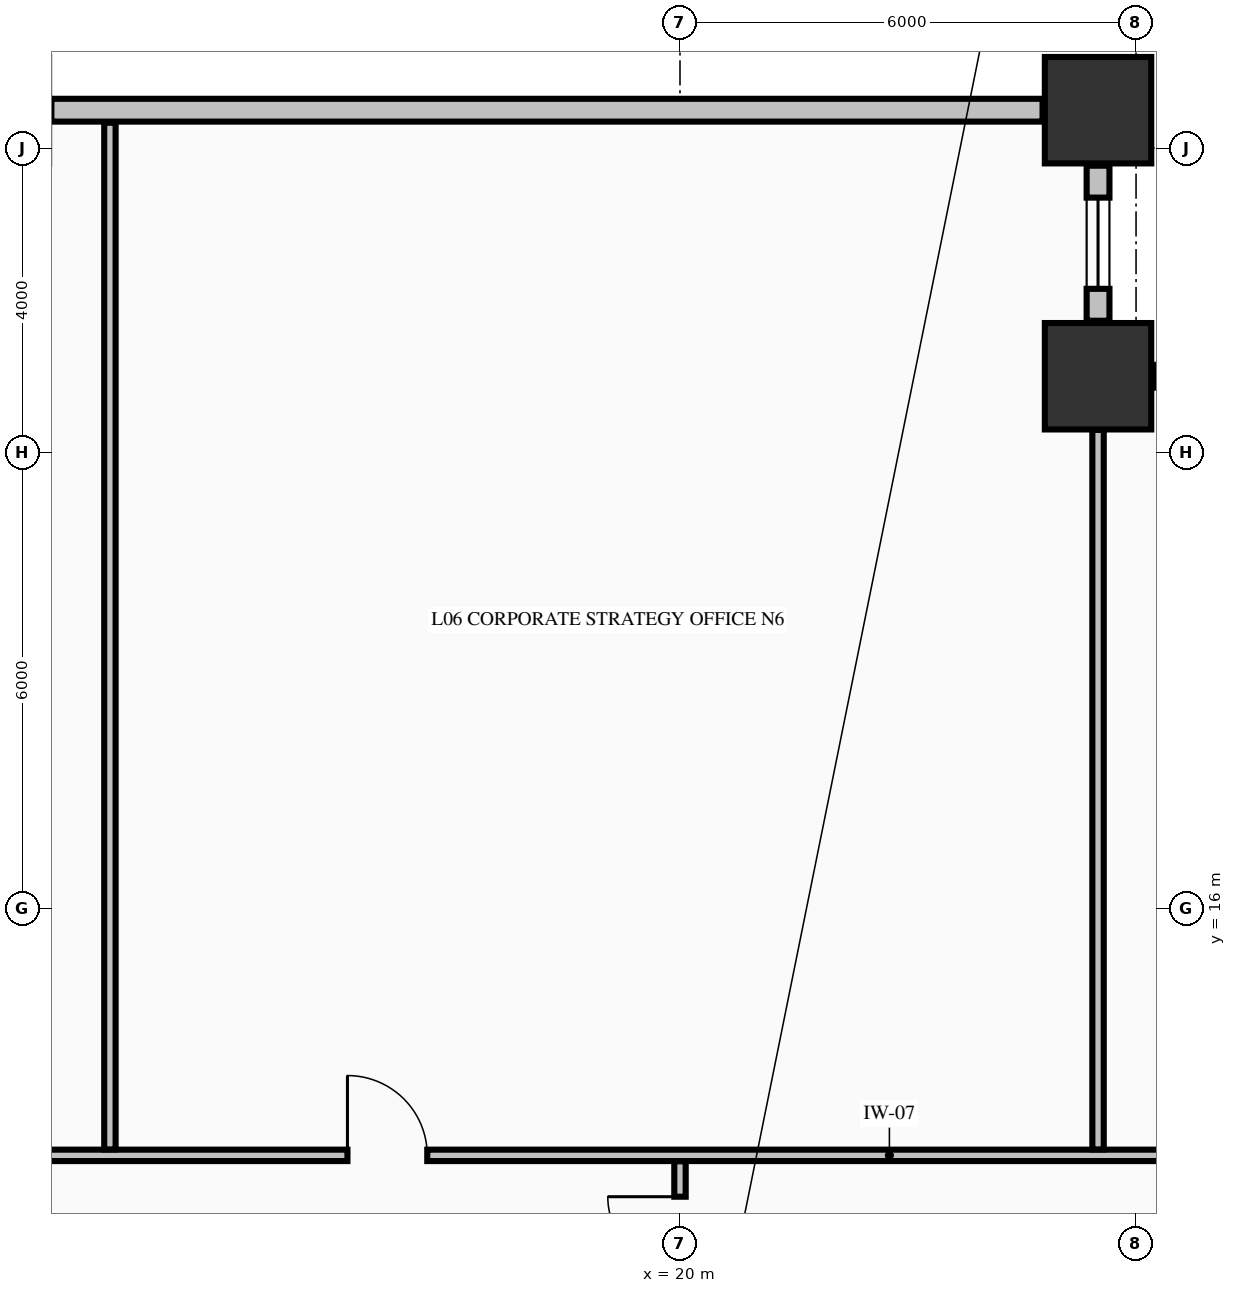
"""IFC4 building model, lengths in metres.
Left out: names, types, materials, properties, quantities, classifications, styles, units other than length and angle.
Written with IfcOpenShell. Run it as: python <this file> out.ifc"""

import sys

from ifc_helpers import new_model, si_unit, direction, frame, frame_2d, origin, origin_2d, place, context, subcontext, project, spatial, rectangle, extrude, element, fill, save


model = new_model("IFC4")
c1 = context("Model", 3, precision=1e-05, world=origin(), true_north=direction((0.0, 1.0)))
c2 = subcontext(c1, "Body", "Model", "MODEL_VIEW")
j1 = project(units=[si_unit("LENGTHUNIT", "METRE"), si_unit("PLANEANGLEUNIT", "RADIAN")], contexts=[c1])
p1 = place(None, origin())
s1 = spatial("IfcSite", under=j1, at=p1, CompositionType="ELEMENT")
p2 = place(p1, origin())
s2 = spatial("IfcBuilding", under=s1, at=p2, CompositionType="ELEMENT")
p3 = place(p2, frame((0.0, 0.0, 30.77)))
s3 = spatial("IfcBuildingStorey", under=s2, at=p3, CompositionType="ELEMENT", Elevation=30.77)
for number, where, z_axis, x_axis in (
    (1, (25.5, 26.5, -0.25), (0.0, 0.0, 1.0), (1.0, 0.0, 0.0)),
    (2, (25.5, 23.0, -0.25), (0.0, 0.0, 1.0), (1.0, 0.0, 0.0)),
):
    element("IfcColumn", number, at=place(p3, frame(where, z_axis=z_axis, x_axis=x_axis)), inside=s3, PredefinedType="COLUMN", context=c2, shape_type="SweptSolid", body=[
        extrude(rectangle(XDim=1.4, YDim=1.4, at=origin_2d()), origin(), (0.0, 0.0, 1.0), 3.52),
    ])
p4 = place(p3, frame((28.27, 23.0, 0.0), z_axis=(0.0, 0.0, 1.0), x_axis=(-1.0, 0.0, 0.0)))
e3 = element("IfcWall", 3, at=p4, inside=s3, PredefinedType="STANDARD", context=c2, shape_type="SweptSolid", body=[
    extrude(rectangle(XDim=2.04, YDim=0.3, at=frame_2d((1.02, 0.0))), origin(), (0.0, 0.0, 1.0), 2.662),
])
p5 = place(p4, frame((0.42, 0.0, 0.82)))
e4 = element("IfcOpeningElement", 4, at=p5, cuts=e3, PredefinedType="OPENING", context=c2, shape_type="SweptSolid", body=[
    extrude(rectangle(XDim=1.2, YDim=1.65, at=frame_2d((0.6, 0.825))), frame((0.0, 0.16, 0.0), z_axis=(0.0, -1.0, 0.0), x_axis=(1.0, 0.0, 0.0)), (0.0, 0.0, 1.0), 0.32),
])
p6 = place(p3, frame((25.5, 23.73, 0.0), z_axis=(0.0, 0.0, 1.0), x_axis=(0.0, 1.0, 0.0)))
e5 = element("IfcWall", 5, at=p6, inside=s3, PredefinedType="STANDARD", context=c2, shape_type="SweptSolid", body=[
    extrude(rectangle(XDim=2.04, YDim=0.3, at=frame_2d((1.02, 0.0))), origin(), (0.0, 0.0, 1.0), 2.662),
])
p7 = place(p6, frame((0.42, 0.0, 0.82)))
e6 = element("IfcOpeningElement", 6, at=p7, cuts=e5, PredefinedType="OPENING", context=c2, shape_type="SweptSolid", body=[
    extrude(rectangle(XDim=1.2, YDim=1.65, at=frame_2d((0.6, 0.825))), frame((0.0, 0.16, 0.0), z_axis=(0.0, -1.0, 0.0), x_axis=(1.0, 0.0, 0.0)), (0.0, 0.0, 1.0), 0.32),
])
p8 = place(p3, frame((24.77, 26.5, 0.0), z_axis=(0.0, 0.0, 1.0), x_axis=(-1.0, 0.0, 0.0)))
e7 = element("IfcWall", 7, at=p8, inside=s3, PredefinedType="STANDARD", context=c2, shape_type="SweptSolid", body=[
    extrude(rectangle(XDim=13.04, YDim=0.3, at=frame_2d((6.52, 0.0))), origin(), (0.0, 0.0, 1.0), 2.662),
])
p9 = place(p3, frame((-23.835, 12.75, 0.0), z_axis=(0.0, 0.0, 1.0), x_axis=(1.0, 0.0, 0.0)))
e8 = element("IfcWall", 8, at=p9, inside=s3, PredefinedType="PARTITIONING", context=c2, shape_type="SweptSolid", body=[
    extrude(rectangle(XDim=52.67, YDim=0.15, at=frame_2d((26.335, 0.0))), origin(), (0.0, 0.0, 1.0), 3.27),
])
p10 = place(p9, frame((5.71, 0.0, 0.0)))
e9 = element("IfcOpeningElement", 9, at=p10, cuts=e8, PredefinedType="OPENING", context=c2, shape_type="SweptSolid", body=[
    extrude(rectangle(XDim=0.95, YDim=2.15, at=frame_2d((0.475, 1.075))), frame((0.0, 0.085, 0.0), z_axis=(0.0, -1.0, 0.0), x_axis=(1.0, 0.0, 0.0)), (0.0, 0.0, 1.0), 0.17),
])
p11 = place(p9, frame((13.21, 0.0, 0.0)))
e10 = element("IfcOpeningElement", 10, at=p11, cuts=e8, PredefinedType="OPENING", context=c2, shape_type="SweptSolid", body=[
    extrude(rectangle(XDim=0.95, YDim=2.15, at=frame_2d((0.475, 1.075))), frame((0.0, 0.085, 0.0), z_axis=(0.0, -1.0, 0.0), x_axis=(1.0, 0.0, 0.0)), (0.0, 0.0, 1.0), 0.17),
])
p12 = place(p9, frame((17.56, 0.0, 0.0)))
e11 = element("IfcOpeningElement", 11, at=p12, cuts=e8, PredefinedType="OPENING", context=c2, shape_type="SweptSolid", body=[
    extrude(rectangle(XDim=0.95, YDim=2.15, at=frame_2d((0.475, 1.075))), frame((0.0, 0.085, 0.0), z_axis=(0.0, -1.0, 0.0), x_axis=(1.0, 0.0, 0.0)), (0.0, 0.0, 1.0), 0.17),
])
p13 = place(p9, frame((21.91, 0.0, 0.0)))
e12 = element("IfcOpeningElement", 12, at=p13, cuts=e8, PredefinedType="OPENING", context=c2, shape_type="SweptSolid", body=[
    extrude(rectangle(XDim=0.95, YDim=2.15, at=frame_2d((0.475, 1.075))), frame((0.0, 0.085, 0.0), z_axis=(0.0, -1.0, 0.0), x_axis=(1.0, 0.0, 0.0)), (0.0, 0.0, 1.0), 0.17),
])
p14 = place(p9, frame((31.21, 0.0, 0.0)))
e13 = element("IfcOpeningElement", 13, at=p14, cuts=e8, PredefinedType="OPENING", context=c2, shape_type="SweptSolid", body=[
    extrude(rectangle(XDim=1.05, YDim=2.15, at=frame_2d((0.525, 1.075))), frame((0.0, 0.085, 0.0), z_axis=(0.0, -1.0, 0.0), x_axis=(1.0, 0.0, 0.0)), (0.0, 0.0, 1.0), 0.17),
])
p15 = place(p9, frame((39.46, 0.0, 0.0)))
e14 = element("IfcOpeningElement", 14, at=p15, cuts=e8, PredefinedType="OPENING", context=c2, shape_type="SweptSolid", body=[
    extrude(rectangle(XDim=1.05, YDim=2.15, at=frame_2d((0.525, 1.075))), frame((0.0, 0.085, 0.0), z_axis=(0.0, -1.0, 0.0), x_axis=(1.0, 0.0, 0.0)), (0.0, 0.0, 1.0), 0.17),
])
p16 = place(p3, frame((12.5, 12.828, 0.0), z_axis=(0.0, 0.0, 1.0), x_axis=(0.0, 1.0, 0.0)))
e15 = element("IfcWall", 15, at=p16, inside=s3, PredefinedType="PARTITIONING", context=c2, shape_type="SweptSolid", body=[
    extrude(rectangle(XDim=13.507, YDim=0.15, at=frame_2d((6.753, 0.0))), origin(), (0.0, 0.0, 1.0), 3.27),
])
p17 = place(p3, frame((20.0, 11.106, 0.0), z_axis=(0.0, 0.0, 1.0), x_axis=(0.0, 1.0, 0.0)))
e16 = element("IfcWall", 16, at=p17, inside=s3, PredefinedType="PARTITIONING", context=c2, shape_type="SweptSolid", body=[
    extrude(rectangle(XDim=1.566, YDim=0.15, at=frame_2d((0.783, 0.0))), origin(), (0.0, 0.0, 1.0), 2.61),
])
p18 = place(p17, frame((0.15, 0.0, 0.0)))
e17 = element("IfcOpeningElement", 17, at=p18, cuts=e16, PredefinedType="OPENING", context=c2, shape_type="SweptSolid", body=[
    extrude(rectangle(XDim=0.95, YDim=2.15, at=frame_2d((0.475, 1.075))), frame((0.0, 0.085, 0.0), z_axis=(0.0, -1.0, 0.0), x_axis=(1.0, 0.0, 0.0)), (0.0, 0.0, 1.0), 0.17),
])
p19 = place(p3, frame((25.5, 12.828, 0.0), z_axis=(0.0, 0.0, 1.0), x_axis=(0.0, 1.0, 0.0)))
e18 = element("IfcWall", 18, at=p19, inside=s3, PredefinedType="PARTITIONING", context=c2, shape_type="SweptSolid", body=[
    extrude(rectangle(XDim=9.466, YDim=0.15, at=frame_2d((4.733, 0.0))), origin(), (0.0, 0.0, 1.0), 3.27),
])
p20 = place(p7, origin())
e19 = element("IfcWindow", 19, at=p20, inside=s3, PartitioningType="SINGLE_PANEL", PredefinedType="WINDOW", context=c2, shape_type="SweptSolid", body=[
    extrude(rectangle(XDim=1.2, YDim=1.65, at=frame_2d((0.6, 0.825))), frame((0.0, 0.03, 0.0), z_axis=(0.0, -1.0, 0.0), x_axis=(1.0, 0.0, 0.0)), (0.0, 0.0, 1.0), 0.06),
])
fill(e6, e19)
p21 = place(p15, origin())
e20 = element("IfcDoor", 20, at=p21, inside=s3, OperationType="SINGLE_SWING_LEFT", PredefinedType="DOOR", context=c2, shape_type="SweptSolid", body=[
    extrude(rectangle(XDim=1.05, YDim=2.15, at=frame_2d((0.525, 1.075))), frame((0.0, 0.025, 0.0), z_axis=(0.0, -1.0, 0.0), x_axis=(1.0, 0.0, 0.0)), (0.0, 0.0, 1.0), 0.05),
])
fill(e14, e20)
p22 = place(p18, origin())
e21 = element("IfcDoor", 21, at=p22, inside=s3, OperationType="SINGLE_SWING_RIGHT", PredefinedType="DOOR", context=c2, shape_type="SweptSolid", body=[
    extrude(rectangle(XDim=0.95, YDim=2.15, at=frame_2d((0.475, 1.075))), frame((0.0, 0.025, 0.0), z_axis=(0.0, -1.0, 0.0), x_axis=(1.0, 0.0, 0.0)), (0.0, 0.0, 1.0), 0.05),
])
fill(e17, e21)
save(model, sys.argv[1])
